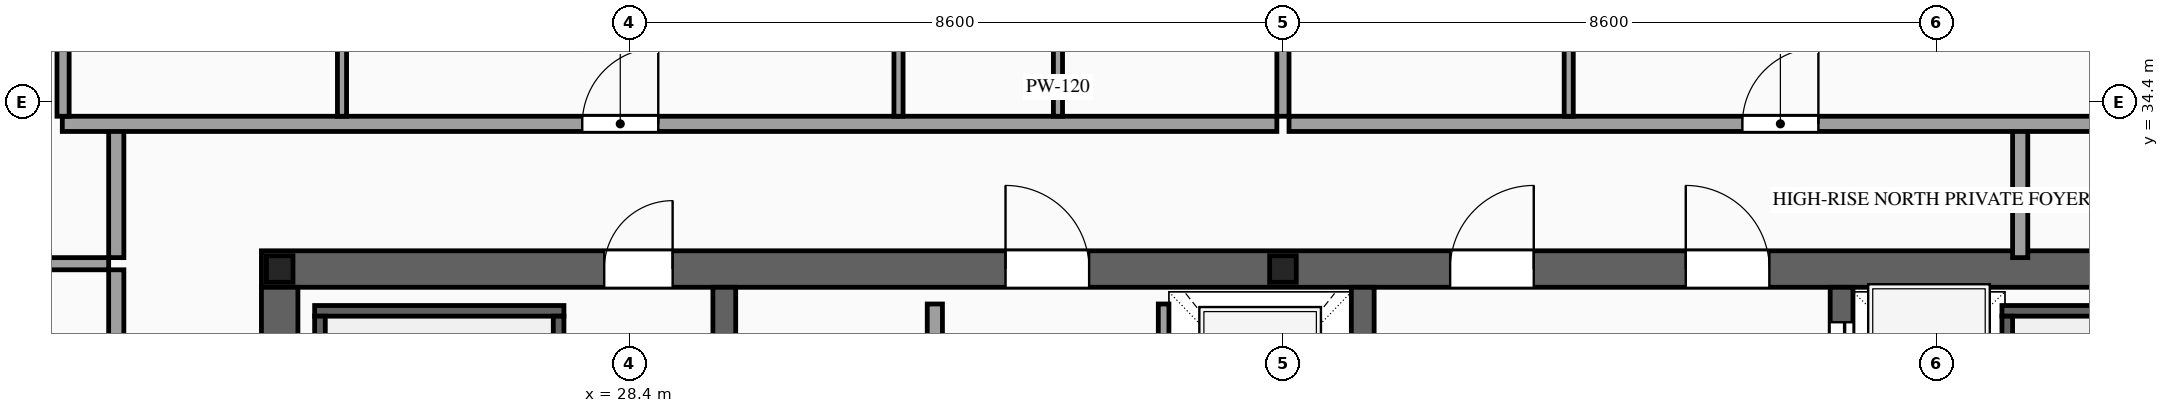
"""IFC4 building model, lengths in metres.
Left out: names, types, materials, properties, quantities, classifications, styles, units other than length and angle.
Written with IfcOpenShell. Run it as: python <this file> out.ifc"""

import sys

from ifc_helpers import new_model, si_unit, direction, frame, frame_2d, origin, origin_2d, place, context, subcontext, project, spatial, rectangle, i_section, extrude, source, transform, mapped, element, fill, save


model = new_model("IFC4")
c1 = context("Model", 3, precision=1e-05, world=origin(), true_north=direction((0.0, 1.0)))
c2 = subcontext(c1, "Body", "Model", "MODEL_VIEW")
j1 = project(units=[si_unit("LENGTHUNIT", "METRE"), si_unit("PLANEANGLEUNIT", "RADIAN")], contexts=[c1])
p1 = place(None, origin())
s1 = spatial("IfcSite", under=j1, at=p1, CompositionType="ELEMENT")
p2 = place(p1, origin())
s2 = spatial("IfcBuilding", under=s1, at=p2, CompositionType="ELEMENT")
p3 = place(p2, frame((0.0, 0.0, 311.2)))
s3 = spatial("IfcBuildingStorey", under=s2, at=p3, CompositionType="ELEMENT", Elevation=311.2)
p4 = place(p3, frame((23.56, 32.2, 0.0), z_axis=(0.0, 0.0, 1.0), x_axis=(1.0, 0.0, 0.0)))
e1 = element("IfcWall", 1, at=p4, inside=s3, PredefinedType="SHEAR", context=c2, shape_type="SweptSolid", body=[
    extrude(rectangle(XDim=26.88, YDim=0.48, at=frame_2d((13.44, 0.0))), origin(), (0.0, 0.0, 1.0), 3.5),
])
p5 = place(p4, frame((4.51, 0.0, 0.0)))
e2 = element("IfcOpeningElement", 2, at=p5, cuts=e1, PredefinedType="OPENING", context=c2, shape_type="SweptSolid", body=[
    extrude(rectangle(XDim=0.9, YDim=2.15, at=frame_2d((0.45, 1.075))), frame((0.0, 0.255, 0.0), z_axis=(0.0, -1.0, 0.0), x_axis=(1.0, 0.0, 0.0)), (0.0, 0.0, 1.0), 0.51),
])
p6 = place(p4, frame((9.79, 0.0, 0.0)))
e3 = element("IfcOpeningElement", 3, at=p6, cuts=e1, PredefinedType="OPENING", context=c2, shape_type="SweptSolid", body=[
    extrude(rectangle(XDim=1.1, YDim=2.2, at=frame_2d((0.55, 1.1))), frame((0.0, 0.255, 0.0), z_axis=(0.0, -1.0, 0.0), x_axis=(1.0, 0.0, 0.0)), (0.0, 0.0, 1.0), 0.51),
])
p7 = place(p4, frame((15.64, 0.0, 0.0)))
e4 = element("IfcOpeningElement", 4, at=p7, cuts=e1, PredefinedType="OPENING", context=c2, shape_type="SweptSolid", body=[
    extrude(rectangle(XDim=1.1, YDim=2.2, at=frame_2d((0.55, 1.1))), frame((0.0, 0.255, 0.0), z_axis=(0.0, -1.0, 0.0), x_axis=(1.0, 0.0, 0.0)), (0.0, 0.0, 1.0), 0.51),
])
p8 = place(p4, frame((18.74, 0.0, 0.0)))
e5 = element("IfcOpeningElement", 5, at=p8, cuts=e1, PredefinedType="OPENING", context=c2, shape_type="SweptSolid", body=[
    extrude(rectangle(XDim=1.1, YDim=2.2, at=frame_2d((0.55, 1.1))), frame((0.0, 0.255, 0.0), z_axis=(0.0, -1.0, 0.0), x_axis=(1.0, 0.0, 0.0)), (0.0, 0.0, 1.0), 0.51),
])
m1 = source(origin(), c2, "Body", "SweptSolid", [
    extrude(rectangle(XDim=12.32, YDim=0.48, at=frame_2d((6.16, 0.0))), origin(), (0.0, 0.0, 1.0), 3.5),
])
p9 = place(p3, frame((23.8, 19.64, 0.0), z_axis=(0.0, 0.0, 1.0), x_axis=(0.0, 1.0, 0.0)))
e6 = element("IfcWall", 6, at=p9, inside=s3, PredefinedType="SHEAR", context=c2, shape_type="MappedRepresentation", body=[
    mapped(m1, transform((0.0, 0.0, 0.0), scale=1.0)),
])
m2 = source(origin(), c2, "Body", "SweptSolid", [
    extrude(rectangle(XDim=12.32, YDim=0.3, at=frame_2d((6.16, 0.0))), origin(), (0.0, 0.0, 1.0), 3.5),
])
for number, where, z_axis, x_axis in (
    (7, (29.65, 19.64, 0.0), (0.0, 0.0, 1.0), (0.0, 1.0, 0.0)),
    (8, (38.05, 19.64, 0.0), (0.0, 0.0, 1.0), (0.0, 1.0, 0.0)),
):
    element("IfcWall", number, at=place(p3, frame(where, z_axis=z_axis, x_axis=x_axis)), inside=s3, PredefinedType="SOLIDWALL", context=c2, shape_type="MappedRepresentation", body=[
        mapped(m2, transform((0.0, 0.0, 0.0), scale=1.0)),
    ])
p10 = place(p3, frame((44.35, 19.64, 0.0), z_axis=(0.0, 0.0, 1.0), x_axis=(0.0, 1.0, 0.0)))
e9 = element("IfcWall", 9, at=p10, inside=s3, PredefinedType="SOLIDWALL", context=c2, shape_type="SweptSolid", body=[
    extrude(rectangle(XDim=12.32, YDim=0.3, at=frame_2d((6.16, 0.0))), origin(), (0.0, 0.0, 1.0), 3.5),
])
p11 = place(p10, frame((6.56, 0.0, 0.0)))
e10 = element("IfcOpeningElement", 10, at=p11, cuts=e9, PredefinedType="OPENING", context=c2, shape_type="SweptSolid", body=[
    extrude(rectangle(XDim=1.1, YDim=2.2, at=frame_2d((0.55, 1.1))), frame((0.0, 0.165, 0.0), z_axis=(0.0, -1.0, 0.0), x_axis=(1.0, 0.0, 0.0)), (0.0, 0.0, 1.0), 0.33),
])
p12 = place(p10, frame((8.66, 0.0, 0.0)))
e11 = element("IfcOpeningElement", 11, at=p12, cuts=e9, PredefinedType="OPENING", context=c2, shape_type="SweptSolid", body=[
    extrude(rectangle(XDim=1.1, YDim=2.2, at=frame_2d((0.55, 1.1))), frame((0.0, 0.165, 0.0), z_axis=(0.0, -1.0, 0.0), x_axis=(1.0, 0.0, 0.0)), (0.0, 0.0, 1.0), 0.33),
])
p13 = place(p10, frame((10.76, 0.0, 0.0)))
e12 = element("IfcOpeningElement", 12, at=p13, cuts=e9, PredefinedType="OPENING", context=c2, shape_type="SweptSolid", body=[
    extrude(rectangle(XDim=1.1, YDim=2.2, at=frame_2d((0.55, 1.1))), frame((0.0, 0.165, 0.0), z_axis=(0.0, -1.0, 0.0), x_axis=(1.0, 0.0, 0.0)), (0.0, 0.0, 1.0), 0.33),
])
m3 = source(origin(), c2, "Body", "SweptSolid", [
    extrude(i_section(OverallWidth=0.35, OverallDepth=0.35, WebThickness=0.012, FlangeThickness=0.019, at=origin_2d()), origin(), (0.0, 0.0, 1.0), 3.5),
])
for number, where, z_axis, x_axis in (
    (13, (23.8, 32.2, 0.0), (0.0, 0.0, 1.0), (1.0, 0.0, 0.0)),
    (14, (37.0, 32.2, 0.0), (0.0, 0.0, 1.0), (1.0, 0.0, 0.0)),
):
    element("IfcColumn", number, at=place(p3, frame(where, z_axis=z_axis, x_axis=x_axis)), inside=s3, PredefinedType="COLUMN", context=c2, shape_type="MappedRepresentation", body=[
        mapped(m3, transform((0.0, 0.0, 0.0), scale=1.0)),
    ])
p14 = place(p3, frame((35.43, 29.4, 0.0), z_axis=(0.0, 0.0, 1.0), x_axis=(0.0, 1.0, 0.0)))
e15 = element("IfcWall", 15, at=p14, inside=s3, PredefinedType="SOLIDWALL", context=c2, shape_type="SweptSolid", body=[
    extrude(rectangle(XDim=2.34, YDim=0.14, at=frame_2d((1.17, 0.0))), origin(), (0.0, 0.0, 1.0), 3.28),
])
p15 = place(p14, frame((0.62, 0.0, 0.0)))
e16 = element("IfcOpeningElement", 16, at=p15, cuts=e15, PredefinedType="OPENING", context=c2, shape_type="SweptSolid", body=[
    extrude(rectangle(XDim=1.1, YDim=2.2, at=frame_2d((0.55, 1.1))), frame((0.0, 0.085, 0.0), z_axis=(0.0, -1.0, 0.0), x_axis=(1.0, 0.0, 0.0)), (0.0, 0.0, 1.0), 0.17),
])
m4 = source(origin(), c2, "Body", "SweptSolid", [
    extrude(rectangle(XDim=3.28, YDim=0.14, at=frame_2d((1.64, 0.0))), origin(), (0.0, 0.0, 1.0), 3.28),
])
p16 = place(p3, frame((24.26, 31.65, 0.0), z_axis=(0.0, 0.0, 1.0), x_axis=(1.0, 0.0, 0.0)))
e17 = element("IfcWall", 17, at=p16, inside=s3, PredefinedType="SOLIDWALL", context=c2, shape_type="MappedRepresentation", body=[
    mapped(m4, transform((0.0, 0.0, 0.0), scale=1.0)),
])
m5 = source(origin(), c2, "Body", "SweptSolid", [
    extrude(rectangle(XDim=8.94, YDim=0.14, at=frame_2d((4.47, 0.0))), origin(), (0.0, 0.0, 1.0), 3.28),
])
for number, where, z_axis, x_axis in (
    (18, (24.33, 22.64, 0.0), (0.0, 0.0, 1.0), (0.0, 1.0, 0.0)),
    (19, (27.47, 22.64, 0.0), (0.0, 0.0, 1.0), (0.0, 1.0, 0.0)),
):
    element("IfcWall", number, at=place(p3, frame(where, z_axis=z_axis, x_axis=x_axis)), inside=s3, PredefinedType="SOLIDWALL", context=c2, shape_type="MappedRepresentation", body=[
        mapped(m5, transform((0.0, 0.0, 0.0), scale=1.0)),
    ])
p17 = place(p3, frame((46.46, 31.65, 0.0), z_axis=(0.0, 0.0, 1.0), x_axis=(1.0, 0.0, 0.0)))
e20 = element("IfcWall", 20, at=p17, inside=s3, PredefinedType="SOLIDWALL", context=c2, shape_type="MappedRepresentation", body=[
    mapped(m4, transform((0.0, 0.0, 0.0), scale=1.0)),
])
p18 = place(p3, frame((46.53, 22.64, 0.0), z_axis=(0.0, 0.0, 1.0), x_axis=(0.0, 1.0, 0.0)))
e21 = element("IfcWall", 21, at=p18, inside=s3, PredefinedType="SOLIDWALL", context=c2, shape_type="MappedRepresentation", body=[
    mapped(m5, transform((0.0, 0.0, 0.0), scale=1.0)),
])
p19 = place(p3, frame((32.42, 28.05, 0.0), z_axis=(0.0, 0.0, 1.0), x_axis=(0.0, 1.0, 0.0)))
e22 = element("IfcWall", 22, at=p19, inside=s3, PredefinedType="PARTITIONING", context=c2, shape_type="SweptSolid", body=[
    extrude(rectangle(XDim=3.69, YDim=0.2, at=frame_2d((1.845, 0.0))), origin(), (0.0, 0.0, 1.0), 3.28),
])
p20 = place(p19, frame((1.395, 0.0, 0.0)))
e23 = element("IfcOpeningElement", 23, at=p20, cuts=e22, PredefinedType="OPENING", context=c2, shape_type="SweptSolid", body=[
    extrude(rectangle(XDim=0.9, YDim=2.15, at=frame_2d((0.45, 1.075))), frame((0.0, 0.115, 0.0), z_axis=(0.0, -1.0, 0.0), x_axis=(1.0, 0.0, 0.0)), (0.0, 0.0, 1.0), 0.23),
])
m6 = source(origin(), c2, "Body", "SweptSolid", [
    extrude(rectangle(XDim=1.7, YDim=0.2, at=frame_2d((0.85, 0.0))), origin(), (0.0, 0.0, 1.0), 3.28),
])
for number, where, z_axis, x_axis in (
    (24, (21.65, 32.35, 0.0), (0.0, 0.0, 1.0), (0.0, 1.0, 0.0)),
    (25, (46.7, 32.35, 0.0), (0.0, 0.0, 1.0), (0.0, 1.0, 0.0)),
):
    element("IfcWall", number, at=place(p3, frame(where, z_axis=z_axis, x_axis=x_axis)), inside=s3, PredefinedType="PARTITIONING", context=c2, shape_type="MappedRepresentation", body=[
        mapped(m6, transform((0.0, 0.0, 0.0), scale=1.0)),
    ])
p21 = place(p3, frame((20.94, 34.11, 0.0), z_axis=(0.0, 0.0, 1.0), x_axis=(1.0, 0.0, 0.0)))
e26 = element("IfcWall", 26, at=p21, inside=s3, PredefinedType="PARTITIONING", context=c2, shape_type="SweptSolid", body=[
    extrude(rectangle(XDim=15.98, YDim=0.2, at=frame_2d((7.99, 0.0))), origin(), (0.0, 0.0, 1.0), 3.28),
])
p22 = place(p21, frame((6.841, 0.0, 0.0)))
e27 = element("IfcOpeningElement", 27, at=p22, cuts=e26, PredefinedType="OPENING", context=c2, shape_type="SweptSolid", body=[
    extrude(rectangle(XDim=1.0, YDim=2.2, at=frame_2d((0.5, 1.1))), frame((0.0, 0.115, 0.0), z_axis=(0.0, -1.0, 0.0), x_axis=(1.0, 0.0, 0.0)), (0.0, 0.0, 1.0), 0.23),
])
m7 = source(origin(), c2, "Body", "SweptSolid", [
    extrude(rectangle(XDim=10.54, YDim=0.16, at=frame_2d((5.27, 0.0))), origin(), (0.0, 0.0, 1.0), 2.787),
])
p23 = place(p3, frame((37.0, 34.21, 0.0), z_axis=(0.0, 0.0, 1.0), x_axis=(0.0, 1.0, 0.0)))
e28 = element("IfcWall", 28, at=p23, inside=s3, PredefinedType="PARTITIONING", context=c2, shape_type="MappedRepresentation", body=[
    mapped(m7, transform((0.0, 0.0, 0.0), scale=1.0)),
])
m8 = source(origin(), c2, "Body", "SweptSolid", [
    extrude(rectangle(XDim=2.9, YDim=0.12, at=frame_2d((1.45, 0.0))), origin(), (0.0, 0.0, 1.0), 3.28),
])
p24 = place(p3, frame((24.62, 34.21, 0.0), z_axis=(0.0, 0.0, 1.0), x_axis=(0.0, 1.0, 0.0)))
e29 = element("IfcWall", 29, at=p24, inside=s3, PredefinedType="PARTITIONING", context=c2, shape_type="MappedRepresentation", body=[
    mapped(m8, transform((0.0, 0.0, 0.0), scale=1.0)),
])
p25 = place(p3, frame((34.04, 34.21, 0.0), z_axis=(0.0, 0.0, 1.0), x_axis=(0.0, 1.0, 0.0)))
e30 = element("IfcWall", 30, at=p25, inside=s3, PredefinedType="PARTITIONING", context=c2, shape_type="SweptSolid", body=[
    extrude(rectangle(XDim=2.9, YDim=0.12, at=frame_2d((1.45, 0.0))), origin(), (0.0, 0.0, 1.0), 3.28),
])
p26 = place(p25, frame((1.025, 0.0, 0.0)))
e31 = element("IfcOpeningElement", 31, at=p26, cuts=e30, PredefinedType="OPENING", context=c2, shape_type="SweptSolid", body=[
    extrude(rectangle(XDim=0.85, YDim=2.1, at=frame_2d((0.425, 1.05))), frame((0.0, 0.075, 0.0), z_axis=(0.0, -1.0, 0.0), x_axis=(1.0, 0.0, 0.0)), (0.0, 0.0, 1.0), 0.15),
])
p27 = place(p3, frame((31.942, 34.21, 0.0), z_axis=(0.0, 0.0, 1.0), x_axis=(0.0, 1.0, 0.0)))
e32 = element("IfcWall", 32, at=p27, inside=s3, PredefinedType="PARTITIONING", context=c2, shape_type="SweptSolid", body=[
    extrude(rectangle(XDim=2.9, YDim=0.12, at=frame_2d((1.45, 0.0))), origin(), (0.0, 0.0, 1.0), 3.28),
])
p28 = place(p27, frame((1.025, 0.0, 0.0)))
e33 = element("IfcOpeningElement", 33, at=p28, cuts=e32, PredefinedType="OPENING", context=c2, shape_type="SweptSolid", body=[
    extrude(rectangle(XDim=0.85, YDim=2.1, at=frame_2d((0.425, 1.05))), frame((0.0, 0.075, 0.0), z_axis=(0.0, -1.0, 0.0), x_axis=(1.0, 0.0, 0.0)), (0.0, 0.0, 1.0), 0.15),
])
p29 = place(p3, frame((37.08, 34.11, 0.0), z_axis=(0.0, 0.0, 1.0), x_axis=(1.0, 0.0, 0.0)))
e34 = element("IfcWall", 34, at=p29, inside=s3, PredefinedType="PARTITIONING", context=c2, shape_type="SweptSolid", body=[
    extrude(rectangle(XDim=15.98, YDim=0.2, at=frame_2d((7.99, 0.0))), origin(), (0.0, 0.0, 1.0), 3.28),
])
p30 = place(p29, frame((5.965, 0.0, 0.0)))
e35 = element("IfcOpeningElement", 35, at=p30, cuts=e34, PredefinedType="OPENING", context=c2, shape_type="SweptSolid", body=[
    extrude(rectangle(XDim=1.0, YDim=2.2, at=frame_2d((0.5, 1.1))), frame((0.0, 0.115, 0.0), z_axis=(0.0, -1.0, 0.0), x_axis=(1.0, 0.0, 0.0)), (0.0, 0.0, 1.0), 0.23),
])
m9 = source(origin(), c2, "Body", "SweptSolid", [
    extrude(rectangle(XDim=10.39, YDim=0.16, at=frame_2d((5.195, 0.0))), origin(), (0.0, 0.0, 1.0), 3.28),
])
p31 = place(p3, frame((20.95, 34.21, 0.0), z_axis=(0.0, 0.0, 1.0), x_axis=(0.0, 1.0, 0.0)))
e36 = element("IfcWall", 36, at=p31, inside=s3, PredefinedType="PARTITIONING", context=c2, shape_type="MappedRepresentation", body=[
    mapped(m9, transform((0.0, 0.0, 0.0), scale=1.0)),
])
p32 = place(p3, frame((40.76, 34.21, 0.0), z_axis=(0.0, 0.0, 1.0), x_axis=(0.0, 1.0, 0.0)))
e37 = element("IfcWall", 37, at=p32, inside=s3, PredefinedType="PARTITIONING", context=c2, shape_type="MappedRepresentation", body=[
    mapped(m8, transform((0.0, 0.0, 0.0), scale=1.0)),
])
p33 = place(p3, frame((21.65, 19.41, 0.0), z_axis=(0.0, 0.0, 1.0), x_axis=(0.0, 1.0, 0.0)))
e38 = element("IfcWall", 38, at=p33, inside=s3, PredefinedType="PARTITIONING", context=c2, shape_type="SweptSolid", body=[
    extrude(rectangle(XDim=12.78, YDim=0.2, at=frame_2d((6.39, 0.0))), origin(), (0.0, 0.0, 1.0), 3.28),
])
p34 = place(p33, frame((5.89, 0.0, 0.0)))
e39 = element("IfcOpeningElement", 39, at=p34, cuts=e38, PredefinedType="OPENING", context=c2, shape_type="SweptSolid", body=[
    extrude(rectangle(XDim=1.0, YDim=2.2, at=frame_2d((0.5, 1.1))), frame((0.0, 0.115, 0.0), z_axis=(0.0, -1.0, 0.0), x_axis=(1.0, 0.0, 0.0)), (0.0, 0.0, 1.0), 0.23),
])
m10 = source(origin(), c2, "Body", "SweptSolid", [
    extrude(rectangle(XDim=3.5, YDim=0.16, at=frame_2d((1.75, 0.0))), origin(), (0.0, 0.0, 1.0), 2.825),
])
p35 = place(p3, frame((18.05, 32.27, 0.0), z_axis=(0.0, 0.0, 1.0), x_axis=(1.0, 0.0, 0.0)))
e40 = element("IfcWall", 40, at=p35, inside=s3, PredefinedType="PARTITIONING", context=c2, shape_type="MappedRepresentation", body=[
    mapped(m10, transform((0.0, 0.0, 0.0), scale=1.0)),
])
m11 = source(origin(), c2, "Body", "SweptSolid", [
    extrude(rectangle(XDim=1.1, YDim=2.2, at=frame_2d((0.55, 1.1))), frame((0.0, 0.025, 0.0), z_axis=(0.0, -1.0, 0.0), x_axis=(1.0, 0.0, 0.0)), (0.0, 0.0, 1.0), 0.05),
])
p36 = place(p13, origin())
e41 = element("IfcDoor", 41, at=p36, inside=s3, OperationType="SLIDING_TO_LEFT", PredefinedType="DOOR", context=c2, shape_type="MappedRepresentation", body=[
    mapped(m11, transform((0.0, 0.0, 0.0), scale=1.0)),
])
fill(e12, e41)
m12 = source(origin(), c2, "Body", "SweptSolid", [
    extrude(rectangle(XDim=0.9, YDim=2.15, at=frame_2d((0.45, 1.075))), frame((0.0, 0.025, 0.0), z_axis=(0.0, -1.0, 0.0), x_axis=(1.0, 0.0, 0.0)), (0.0, 0.0, 1.0), 0.05),
])
p37 = place(p5, origin())
e42 = element("IfcDoor", 42, at=p37, inside=s3, OperationType="SINGLE_SWING_RIGHT", PredefinedType="DOOR", context=c2, shape_type="MappedRepresentation", body=[
    mapped(m12, transform((0.0, 0.0, 0.0), scale=1.0)),
])
fill(e2, e42)
m13 = source(origin(), c2, "Body", "SweptSolid", [
    extrude(rectangle(XDim=1.1, YDim=2.2, at=frame_2d((0.55, 1.1))), frame((0.0, 0.025, 0.0), z_axis=(0.0, -1.0, 0.0), x_axis=(1.0, 0.0, 0.0)), (0.0, 0.0, 1.0), 0.05),
])
p38 = place(p6, origin())
e43 = element("IfcDoor", 43, at=p38, inside=s3, OperationType="SINGLE_SWING_LEFT", PredefinedType="DOOR", context=c2, shape_type="MappedRepresentation", body=[
    mapped(m13, transform((0.0, 0.0, 0.0), scale=1.0)),
])
fill(e3, e43)
p39 = place(p7, origin())
e44 = element("IfcDoor", 44, at=p39, inside=s3, OperationType="SINGLE_SWING_RIGHT", PredefinedType="DOOR", context=c2, shape_type="MappedRepresentation", body=[
    mapped(m13, transform((0.0, 0.0, 0.0), scale=1.0)),
])
fill(e4, e44)
p40 = place(p8, origin())
e45 = element("IfcDoor", 45, at=p40, inside=s3, OperationType="SINGLE_SWING_LEFT", PredefinedType="DOOR", context=c2, shape_type="MappedRepresentation", body=[
    mapped(m13, transform((0.0, 0.0, 0.0), scale=1.0)),
])
fill(e5, e45)
m14 = source(origin(), c2, "Body", "SweptSolid", [
    extrude(rectangle(XDim=1.0, YDim=2.2, at=frame_2d((0.5, 1.1))), frame((0.0, 0.025, 0.0), z_axis=(0.0, -1.0, 0.0), x_axis=(1.0, 0.0, 0.0)), (0.0, 0.0, 1.0), 0.05),
])
p41 = place(p22, origin())
e46 = element("IfcDoor", 46, at=p41, inside=s3, OperationType="SINGLE_SWING_RIGHT", PredefinedType="DOOR", context=c2, shape_type="MappedRepresentation", body=[
    mapped(m14, transform((0.0, 0.0, 0.0), scale=1.0)),
])
fill(e27, e46)
p42 = place(p30, origin())
e47 = element("IfcDoor", 47, at=p42, inside=s3, OperationType="SINGLE_SWING_RIGHT", PredefinedType="DOOR", context=c2, shape_type="MappedRepresentation", body=[
    mapped(m14, transform((0.0, 0.0, 0.0), scale=1.0)),
])
fill(e35, e47)
save(model, sys.argv[1])
